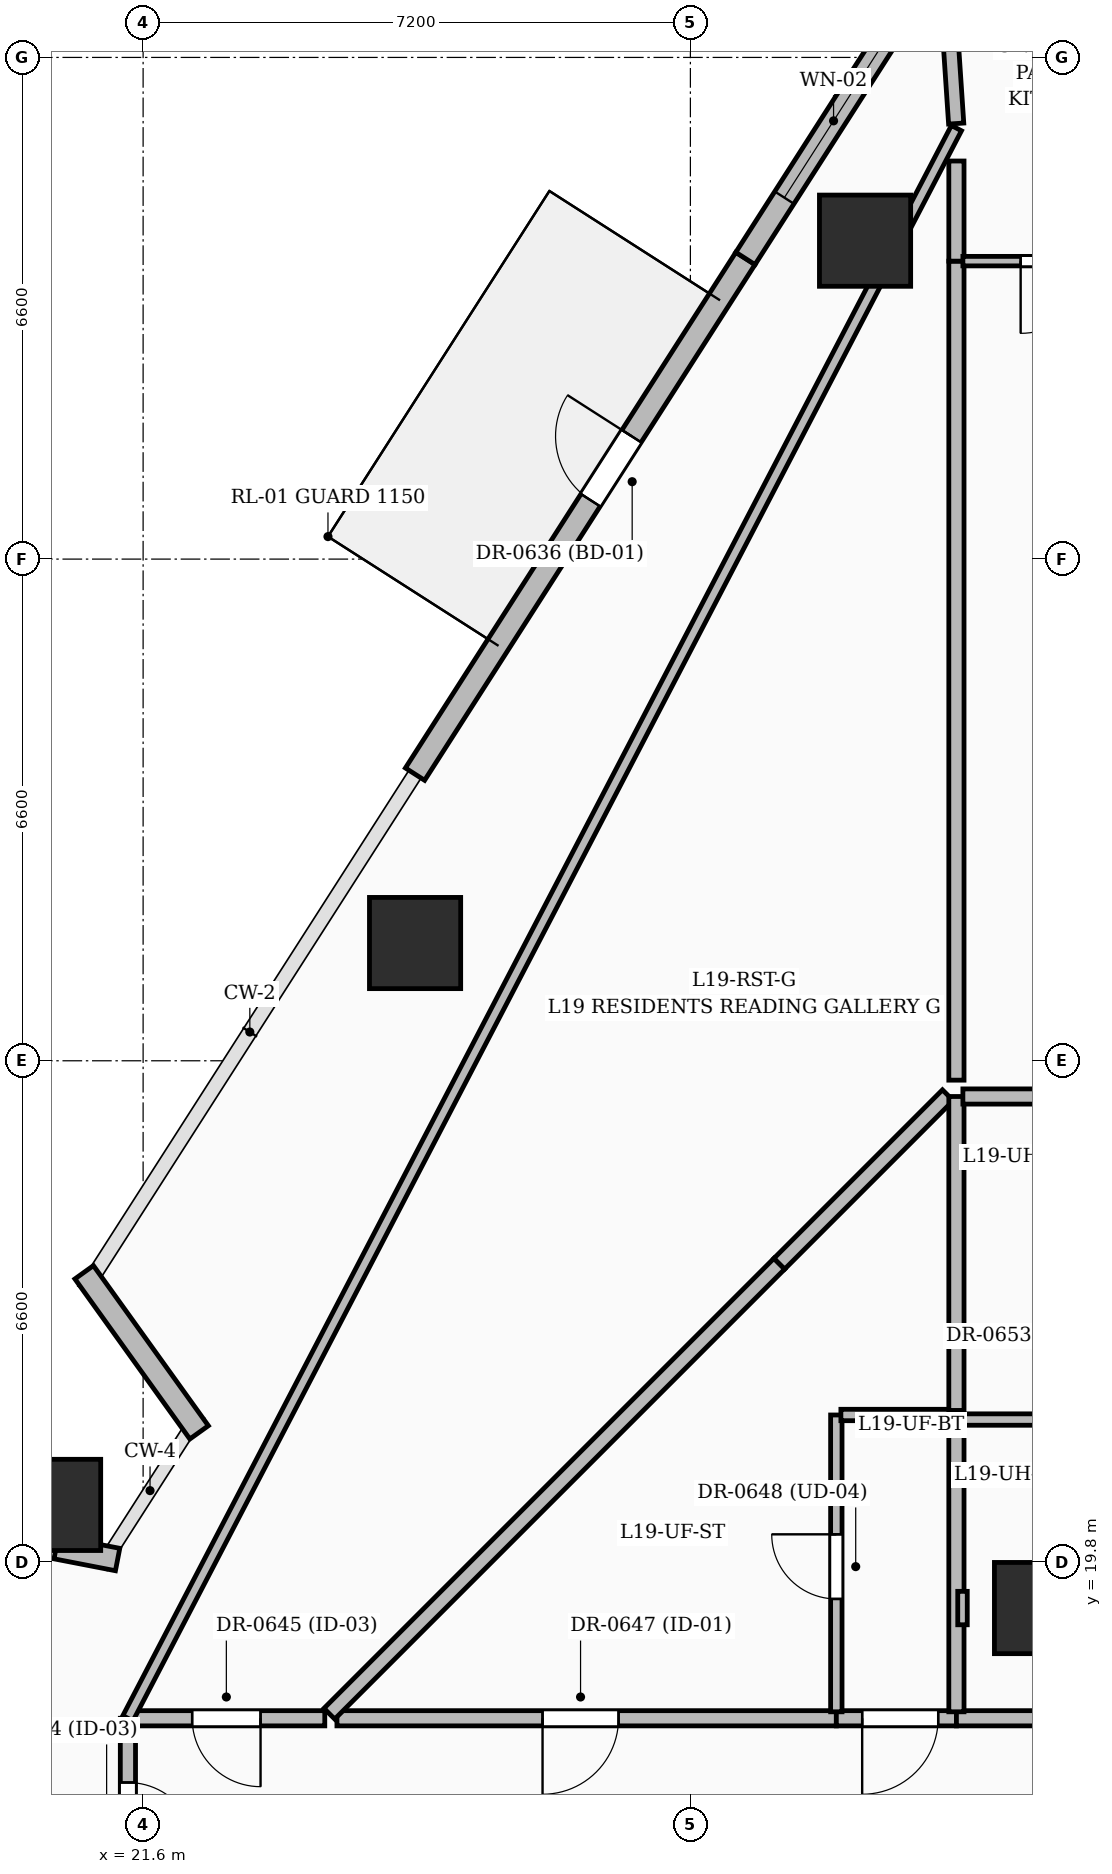
"""IFC4 building model, lengths in metres.
Left out: names, types, materials, properties, quantities, classifications, styles, units other than length and angle.
Written with IfcOpenShell. Run it as: python <this file> out.ifc"""

import sys

from ifc_helpers import new_model, si_unit, direction, frame, frame_2d, origin, origin_2d, place, context, subcontext, project, spatial, rectangle, extrude, element, fill, save


model = new_model("IFC4")
c1 = context("Model", 3, precision=1e-05, world=origin(), true_north=direction((0.0, 1.0)))
c2 = subcontext(c1, "Body", "Model", "MODEL_VIEW")
j1 = project(units=[si_unit("LENGTHUNIT", "METRE"), si_unit("PLANEANGLEUNIT", "RADIAN")], contexts=[c1])
p1 = place(None, origin())
s1 = spatial("IfcSite", under=j1, at=p1, CompositionType="ELEMENT")
p2 = place(p1, origin())
s2 = spatial("IfcBuilding", under=s1, at=p2, CompositionType="ELEMENT")
p3 = place(p2, frame((0.0, 0.0, 78.6)))
s3 = spatial("IfcBuildingStorey", under=s2, at=p3, CompositionType="ELEMENT", Elevation=78.6)
for number, where, z_axis, x_axis in (
    (1, (33.4, 19.2, 0.0), (0.0, 0.0, 1.0), (1.0, 0.0, 0.0)),
    (2, (31.098, 37.189, 0.0), (0.0, 0.0, 1.0), (1.0, 0.0, 0.0)),
    (3, (25.178, 27.949, 0.0), (0.0, 0.0, 1.0), (1.0, 0.0, 0.0)),
    (4, (20.442, 20.557, 0.0), (0.0, 0.0, 1.0), (1.0, 0.0, 0.0)),
):
    element("IfcColumn", number, at=place(p3, frame(where, z_axis=z_axis, x_axis=x_axis)), inside=s3, PredefinedType="COLUMN", context=c2, shape_type="SweptSolid", body=[
        extrude(rectangle(XDim=1.2, YDim=1.2, at=origin_2d()), origin(), (0.0, 0.0, 1.0), 3.6),
    ])
p4 = place(p3, frame((20.456, 19.995, 0.0), z_axis=(0.0, 0.0, 1.0), x_axis=(0.981715557517, -0.190353786749, 0.0)))
e5 = element("IfcWall", 5, at=p4, inside=s3, PredefinedType="SOLIDWALL", context=c2, shape_type="SweptSolid", body=[
    extrude(rectangle(XDim=0.823, YDim=0.3, at=frame_2d((0.412, 0.0))), origin(), (0.0, 0.0, 1.0), 2.35),
])
p5 = place(p3, frame((22.337, 21.511, 0.0), z_axis=(0.0, 0.0, 1.0), x_axis=(-0.583178108206, 0.812344319922, 0.0)))
e6 = element("IfcWall", 6, at=p5, inside=s3, PredefinedType="SOLIDWALL", context=c2, shape_type="SweptSolid", body=[
    extrude(rectangle(XDim=2.593, YDim=0.3, at=frame_2d((1.296, 0.0))), origin(), (0.0, 0.0, 1.0), 2.375),
])
p6 = place(p3, frame((25.177, 30.171, 0.0), z_axis=(0.0, 0.0, 1.0), x_axis=(0.539427662029, 0.842031945616, 0.0)))
e7 = element("IfcWall", 7, at=p6, inside=s3, PredefinedType="SOLIDWALL", context=c2, shape_type="SweptSolid", body=[
    extrude(rectangle(XDim=8.057, YDim=0.3, at=frame_2d((4.029, 0.0))), origin(), (0.0, 0.0, 1.0), 3.35),
])
p7 = place(p6, frame((4.281, 0.0, 0.0)))
e8 = element("IfcOpeningElement", 8, at=p7, cuts=e7, PredefinedType="OPENING", context=c2, shape_type="SweptSolid", body=[
    extrude(rectangle(XDim=1.0, YDim=2.2, at=frame_2d((0.5, 1.1))), frame((0.0, 0.16, 0.0), z_axis=(0.0, -1.0, 0.0), x_axis=(1.0, 0.0, 0.0)), (0.0, 0.0, 1.0), 0.32),
])
p8 = place(p3, frame((29.524, 36.955, 0.0), z_axis=(0.0, 0.0, 1.0), x_axis=(0.539470626143, 0.842004420136, 0.0)))
e9 = element("IfcWall", 9, at=p8, inside=s3, PredefinedType="SOLIDWALL", context=c2, shape_type="SweptSolid", body=[
    extrude(rectangle(XDim=8.058, YDim=0.3, at=frame_2d((4.029, 0.0))), origin(), (0.0, 0.0, 1.0), 3.35),
])
p9 = place(p8, frame((0.95, 0.0, 0.6)))
e10 = element("IfcOpeningElement", 10, at=p9, cuts=e9, PredefinedType="OPENING", context=c2, shape_type="SweptSolid", body=[
    extrude(rectangle(XDim=2.4, YDim=2.1, at=frame_2d((1.2, 1.05))), frame((0.0, 0.16, 0.0), z_axis=(0.0, -1.0, 0.0), x_axis=(1.0, 0.0, 0.0)), (0.0, 0.0, 1.0), 0.32),
])
p10 = place(p3, frame((21.4, 17.75, 0.0), z_axis=(0.0, 0.0, 1.0), x_axis=(0.0, -1.0, 0.0)))
e11 = element("IfcWall", 11, at=p10, inside=s3, PredefinedType="PARTITIONING", context=c2, shape_type="SweptSolid", body=[
    extrude(rectangle(XDim=2.59, YDim=0.2, at=frame_2d((1.295, 0.0))), origin(), (0.0, 0.0, 1.0), 3.01),
])
p11 = place(p10, frame((0.845, 0.0, 0.0)))
e12 = element("IfcOpeningElement", 12, at=p11, cuts=e11, PredefinedType="OPENING", context=c2, shape_type="SweptSolid", body=[
    extrude(rectangle(XDim=0.9, YDim=2.1, at=frame_2d((0.45, 1.05))), frame((0.0, 0.11, 0.0), z_axis=(0.0, -1.0, 0.0), x_axis=(1.0, 0.0, 0.0)), (0.0, 0.0, 1.0), 0.22),
])
p12 = place(p3, frame((30.72, 17.75, 0.0), z_axis=(0.0, 0.0, 1.0), x_axis=(-1.0, 0.0, 0.0)))
e13 = element("IfcWall", 13, at=p12, inside=s3, PredefinedType="PARTITIONING", context=c2, shape_type="SweptSolid", body=[
    extrude(rectangle(XDim=6.57, YDim=0.2, at=frame_2d((3.285, 0.0))), origin(), (0.0, 0.0, 1.0), 2.345),
])
p13 = place(p12, frame((2.865, 0.0, 0.0)))
e14 = element("IfcOpeningElement", 14, at=p13, cuts=e13, PredefinedType="OPENING", context=c2, shape_type="SweptSolid", body=[
    extrude(rectangle(XDim=1.0, YDim=2.2, at=frame_2d((0.5, 1.1))), frame((0.0, 0.11, 0.0), z_axis=(0.0, -1.0, 0.0), x_axis=(1.0, 0.0, 0.0)), (0.0, 0.0, 1.0), 0.22),
])
p14 = place(p3, frame((32.3, 17.75, 0.0), z_axis=(0.0, 0.0, 1.0), x_axis=(-1.0, 0.0, 0.0)))
e15 = element("IfcWall", 15, at=p14, inside=s3, PredefinedType="PARTITIONING", context=c2, shape_type="SweptSolid", body=[
    extrude(rectangle(XDim=1.58, YDim=0.2, at=frame_2d((0.79, 0.0))), origin(), (0.0, 0.0, 1.0), 3.35),
])
p15 = place(p14, frame((0.24, 0.0, 0.0)))
e16 = element("IfcOpeningElement", 16, at=p15, cuts=e15, PredefinedType="OPENING", context=c2, shape_type="SweptSolid", body=[
    extrude(rectangle(XDim=1.0, YDim=2.2, at=frame_2d((0.5, 1.1))), frame((0.0, 0.11, 0.0), z_axis=(0.0, -1.0, 0.0), x_axis=(1.0, 0.0, 0.0)), (0.0, 0.0, 1.0), 0.22),
])
p16 = place(p3, frame((23.99, 17.75, 0.0), z_axis=(0.0, 0.0, 1.0), x_axis=(-1.0, 0.0, 0.0)))
e17 = element("IfcWall", 17, at=p16, inside=s3, PredefinedType="PARTITIONING", context=c2, shape_type="SweptSolid", body=[
    extrude(rectangle(XDim=2.505, YDim=0.2, at=frame_2d((1.252, 0.0))), origin(), (0.0, 0.0, 1.0), 2.345),
])
p17 = place(p16, frame((0.845, 0.0, 0.0)))
e18 = element("IfcOpeningElement", 18, at=p17, cuts=e17, PredefinedType="OPENING", context=c2, shape_type="SweptSolid", body=[
    extrude(rectangle(XDim=0.9, YDim=2.1, at=frame_2d((0.45, 1.05))), frame((0.0, 0.11, 0.0), z_axis=(0.0, -1.0, 0.0), x_axis=(1.0, 0.0, 0.0)), (0.0, 0.0, 1.0), 0.22),
])
p18 = place(p3, frame((34.87, 17.75, 0.0), z_axis=(0.0, 0.0, 1.0), x_axis=(-1.0, 0.0, 0.0)))
e19 = element("IfcWall", 19, at=p18, inside=s3, PredefinedType="PARTITIONING", context=c2, shape_type="SweptSolid", body=[
    extrude(rectangle(XDim=2.57, YDim=0.2, at=frame_2d((1.285, 0.0))), origin(), (0.0, 0.0, 1.0), 2.309),
])
p19 = place(p3, frame((21.4, 17.75, 0.0), z_axis=(0.0, 0.0, 1.0), x_axis=(0.46207959711, 0.886838455376, 0.0)))
e20 = element("IfcWall", 20, at=p19, inside=s3, PredefinedType="PARTITIONING", context=c2, shape_type="SweptSolid", body=[
    extrude(rectangle(XDim=23.589, YDim=0.15, at=frame_2d((11.795, 0.0))), origin(), (0.0, 0.0, 1.0), 2.345),
])
p20 = place(p3, frame((32.297, 38.73, 0.0), z_axis=(0.0, 0.0, 1.0), x_axis=(-0.066629370629, 0.997777794386, 0.0)))
e21 = element("IfcWall", 21, at=p20, inside=s3, PredefinedType="PARTITIONING", context=c2, shape_type="SweptSolid", body=[
    extrude(rectangle(XDim=2.056, YDim=0.2, at=frame_2d((1.028, 0.0))), origin(), (0.0, 0.0, 1.0), 3.35),
])
p21 = place(p3, frame((30.72, 17.835, 0.0), z_axis=(0.0, 0.0, 1.0), x_axis=(0.0, 1.0, 0.0)))
e22 = element("IfcWall", 22, at=p21, inside=s3, PredefinedType="PARTITIONING", context=c2, shape_type="SweptSolid", body=[
    extrude(rectangle(XDim=3.905, YDim=0.15, at=frame_2d((1.953, 0.0))), origin(), (0.0, 0.0, 1.0), 2.345),
])
p22 = place(p21, frame((1.485, 0.0, 0.0)))
e23 = element("IfcOpeningElement", 23, at=p22, cuts=e22, PredefinedType="OPENING", context=c2, shape_type="SweptSolid", body=[
    extrude(rectangle(XDim=0.85, YDim=2.1, at=frame_2d((0.425, 1.05))), frame((0.0, 0.085, 0.0), z_axis=(0.0, -1.0, 0.0), x_axis=(1.0, 0.0, 0.0)), (0.0, 0.0, 1.0), 0.17),
])
p23 = place(p3, frame((29.97, 23.73, 0.0), z_axis=(0.0, 0.0, 1.0), x_axis=(-0.707106781187, -0.707106781187, 0.0)))
e24 = element("IfcWall", 24, at=p23, inside=s3, PredefinedType="PARTITIONING", context=c2, shape_type="SweptSolid", body=[
    extrude(rectangle(XDim=8.372, YDim=0.2, at=frame_2d((4.186, 0.0))), origin(), (0.0, 0.0, 1.0), 2.345),
])
p24 = place(p3, frame((30.78, 21.74, 0.0), z_axis=(0.0, 0.0, 1.0), x_axis=(1.0, 0.0, 0.0)))
e25 = element("IfcWall", 25, at=p24, inside=s3, PredefinedType="PARTITIONING", context=c2, shape_type="SweptSolid", body=[
    extrude(rectangle(XDim=1.52, YDim=0.15, at=frame_2d((0.76, 0.0))), origin(), (0.0, 0.0, 1.0), 2.345),
])
p25 = place(p3, frame((32.187, 25.947, 0.0), z_axis=(0.0, 0.0, 1.0), x_axis=(-0.707106781187, -0.707106781187, 0.0)))
e26 = element("IfcWall", 26, at=p25, inside=s3, PredefinedType="PARTITIONING", context=c2, shape_type="SweptSolid", body=[
    extrude(rectangle(XDim=3.135, YDim=0.2, at=frame_2d((1.568, 0.0))), origin(), (0.0, 0.0, 1.0), 3.35),
])
p26 = place(p3, frame((32.3, 21.8, 0.0), z_axis=(0.0, 0.0, 1.0), x_axis=(0.0, 1.0, 0.0)))
e27 = element("IfcWall", 27, at=p26, inside=s3, PredefinedType="PARTITIONING", context=c2, shape_type="SweptSolid", body=[
    extrude(rectangle(XDim=4.13, YDim=0.2, at=frame_2d((2.065, 0.0))), origin(), (0.0, 0.0, 1.0), 3.01),
])
p27 = place(p3, frame((32.3, 17.835, 0.0), z_axis=(0.0, 0.0, 1.0), x_axis=(0.0, 1.0, 0.0)))
e28 = element("IfcWall", 28, at=p27, inside=s3, PredefinedType="PARTITIONING", context=c2, shape_type="SweptSolid", body=[
    extrude(rectangle(XDim=3.845, YDim=0.2, at=frame_2d((1.922, 0.0))), origin(), (0.0, 0.0, 1.0), 2.345),
])
p28 = place(p3, frame((32.3, 26.145, 0.0), z_axis=(0.0, 0.0, 1.0), x_axis=(0.0, 1.0, 0.0)))
e29 = element("IfcWall", 29, at=p28, inside=s3, PredefinedType="PARTITIONING", context=c2, shape_type="SweptSolid", body=[
    extrude(rectangle(XDim=10.775, YDim=0.2, at=frame_2d((5.387, 0.0))), origin(), (0.0, 0.0, 1.0), 2.345),
])
p29 = place(p3, frame((32.3, 36.92, 0.0), z_axis=(0.0, 0.0, 1.0), x_axis=(0.0, 1.0, 0.0)))
e30 = element("IfcWall", 30, at=p29, inside=s3, PredefinedType="PARTITIONING", context=c2, shape_type="SweptSolid", body=[
    extrude(rectangle(XDim=1.317, YDim=0.2, at=frame_2d((0.659, 0.0))), origin(), (0.0, 0.0, 1.0), 2.37),
])
p30 = place(p3, frame((34.5, 21.68, 0.0), z_axis=(0.0, 0.0, 1.0), x_axis=(-1.0, 0.0, 0.0)))
e31 = element("IfcWall", 31, at=p30, inside=s3, PredefinedType="PARTITIONING", context=c2, shape_type="SweptSolid", body=[
    extrude(rectangle(XDim=2.115, YDim=0.15, at=frame_2d((1.058, 0.0))), origin(), (0.0, 0.0, 1.0), 3.35),
])
p31 = place(p3, frame((34.44, 25.93, 0.0), z_axis=(0.0, 0.0, 1.0), x_axis=(-1.0, 0.0, 0.0)))
e32 = element("IfcWall", 32, at=p31, inside=s3, PredefinedType="PARTITIONING", context=c2, shape_type="SweptSolid", body=[
    extrude(rectangle(XDim=2.055, YDim=0.2, at=frame_2d((1.027, 0.0))), origin(), (0.0, 0.0, 1.0), 3.01),
])
p32 = place(p3, frame((34.94, 36.92, 0.0), z_axis=(0.0, 0.0, 1.0), x_axis=(-1.0, 0.0, 0.0)))
e33 = element("IfcWall", 33, at=p32, inside=s3, PredefinedType="PARTITIONING", context=c2, shape_type="SweptSolid", body=[
    extrude(rectangle(XDim=2.555, YDim=0.125, at=frame_2d((1.277, 0.0))), origin(), (0.0, 0.0, 1.0), 2.37),
])
p33 = place(p32, frame((0.845, 0.0, 0.0)))
e34 = element("IfcOpeningElement", 34, at=p33, cuts=e33, PredefinedType="OPENING", context=c2, shape_type="SweptSolid", body=[
    extrude(rectangle(XDim=0.95, YDim=2.2, at=frame_2d((0.475, 1.1))), frame((0.0, 0.072, 0.0), z_axis=(0.0, -1.0, 0.0), x_axis=(1.0, 0.0, 0.0)), (0.0, 0.0, 1.0), 0.145),
])
p34 = place(p3, frame((32.38, 18.98, 0.0), z_axis=(0.0, 0.0, 1.0), x_axis=(0.0, 1.0, 0.0)))
e35 = element("IfcWall", 35, at=p34, inside=s3, PredefinedType="PARTITIONING", context=c2, shape_type="SweptSolid", body=[
    extrude(rectangle(XDim=0.44, YDim=0.125, at=frame_2d((0.22, 0.0))), origin(), (0.0, 0.0, 1.0), 3.35),
])
p35 = place(p7, origin())
e36 = element("IfcDoor", 36, at=p35, inside=s3, OperationType="SINGLE_SWING_RIGHT", PredefinedType="DOOR", context=c2, shape_type="SweptSolid", body=[
    extrude(rectangle(XDim=1.0, YDim=2.2, at=frame_2d((0.5, 1.1))), frame((0.0, 0.025, 0.0), z_axis=(0.0, -1.0, 0.0), x_axis=(1.0, 0.0, 0.0)), (0.0, 0.0, 1.0), 0.05),
])
fill(e8, e36)
p36 = place(p9, origin())
e37 = element("IfcWindow", 37, at=p36, inside=s3, PartitioningType="SINGLE_PANEL", PredefinedType="WINDOW", context=c2, shape_type="SweptSolid", body=[
    extrude(rectangle(XDim=2.4, YDim=2.1, at=frame_2d((1.2, 1.05))), frame((0.0, 0.03, 0.0), z_axis=(0.0, -1.0, 0.0), x_axis=(1.0, 0.0, 0.0)), (0.0, 0.0, 1.0), 0.06),
])
fill(e10, e37)
p37 = place(p11, origin())
e38 = element("IfcDoor", 38, at=p37, inside=s3, OperationType="SINGLE_SWING_RIGHT", PredefinedType="DOOR", context=c2, shape_type="SweptSolid", body=[
    extrude(rectangle(XDim=0.9, YDim=2.1, at=frame_2d((0.45, 1.05))), frame((0.0, 0.025, 0.0), z_axis=(0.0, -1.0, 0.0), x_axis=(1.0, 0.0, 0.0)), (0.0, 0.0, 1.0), 0.05),
])
fill(e12, e38)
p38 = place(p17, origin())
e39 = element("IfcDoor", 39, at=p38, inside=s3, OperationType="SINGLE_SWING_LEFT", PredefinedType="DOOR", context=c2, shape_type="SweptSolid", body=[
    extrude(rectangle(XDim=0.9, YDim=2.1, at=frame_2d((0.45, 1.05))), frame((0.0, 0.025, 0.0), z_axis=(0.0, -1.0, 0.0), x_axis=(1.0, 0.0, 0.0)), (0.0, 0.0, 1.0), 0.05),
])
fill(e18, e39)
p39 = place(p13, origin())
e40 = element("IfcDoor", 40, at=p39, inside=s3, OperationType="SINGLE_SWING_RIGHT", PredefinedType="DOOR", context=c2, shape_type="SweptSolid", body=[
    extrude(rectangle(XDim=1.0, YDim=2.2, at=frame_2d((0.5, 1.1))), frame((0.0, 0.025, 0.0), z_axis=(0.0, -1.0, 0.0), x_axis=(1.0, 0.0, 0.0)), (0.0, 0.0, 1.0), 0.05),
])
fill(e14, e40)
p40 = place(p22, origin())
e41 = element("IfcDoor", 41, at=p40, inside=s3, OperationType="SINGLE_SWING_RIGHT", PredefinedType="DOOR", context=c2, shape_type="SweptSolid", body=[
    extrude(rectangle(XDim=0.85, YDim=2.1, at=frame_2d((0.425, 1.05))), frame((0.0, 0.025, 0.0), z_axis=(0.0, -1.0, 0.0), x_axis=(1.0, 0.0, 0.0)), (0.0, 0.0, 1.0), 0.05),
])
fill(e23, e41)
p41 = place(p33, origin())
e42 = element("IfcDoor", 42, at=p41, inside=s3, OperationType="SINGLE_SWING_RIGHT", PredefinedType="DOOR", context=c2, shape_type="SweptSolid", body=[
    extrude(rectangle(XDim=0.95, YDim=2.2, at=frame_2d((0.475, 1.1))), frame((0.0, 0.025, 0.0), z_axis=(0.0, -1.0, 0.0), x_axis=(1.0, 0.0, 0.0)), (0.0, 0.0, 1.0), 0.05),
])
fill(e34, e42)
p42 = place(p15, origin())
e43 = element("IfcDoor", 43, at=p42, inside=s3, OperationType="SINGLE_SWING_RIGHT", PredefinedType="DOOR", context=c2, shape_type="SweptSolid", body=[
    extrude(rectangle(XDim=1.0, YDim=2.2, at=frame_2d((0.5, 1.1))), frame((0.0, 0.025, 0.0), z_axis=(0.0, -1.0, 0.0), x_axis=(1.0, 0.0, 0.0)), (0.0, 0.0, 1.0), 0.05),
])
fill(e16, e43)
save(model, sys.argv[1])
